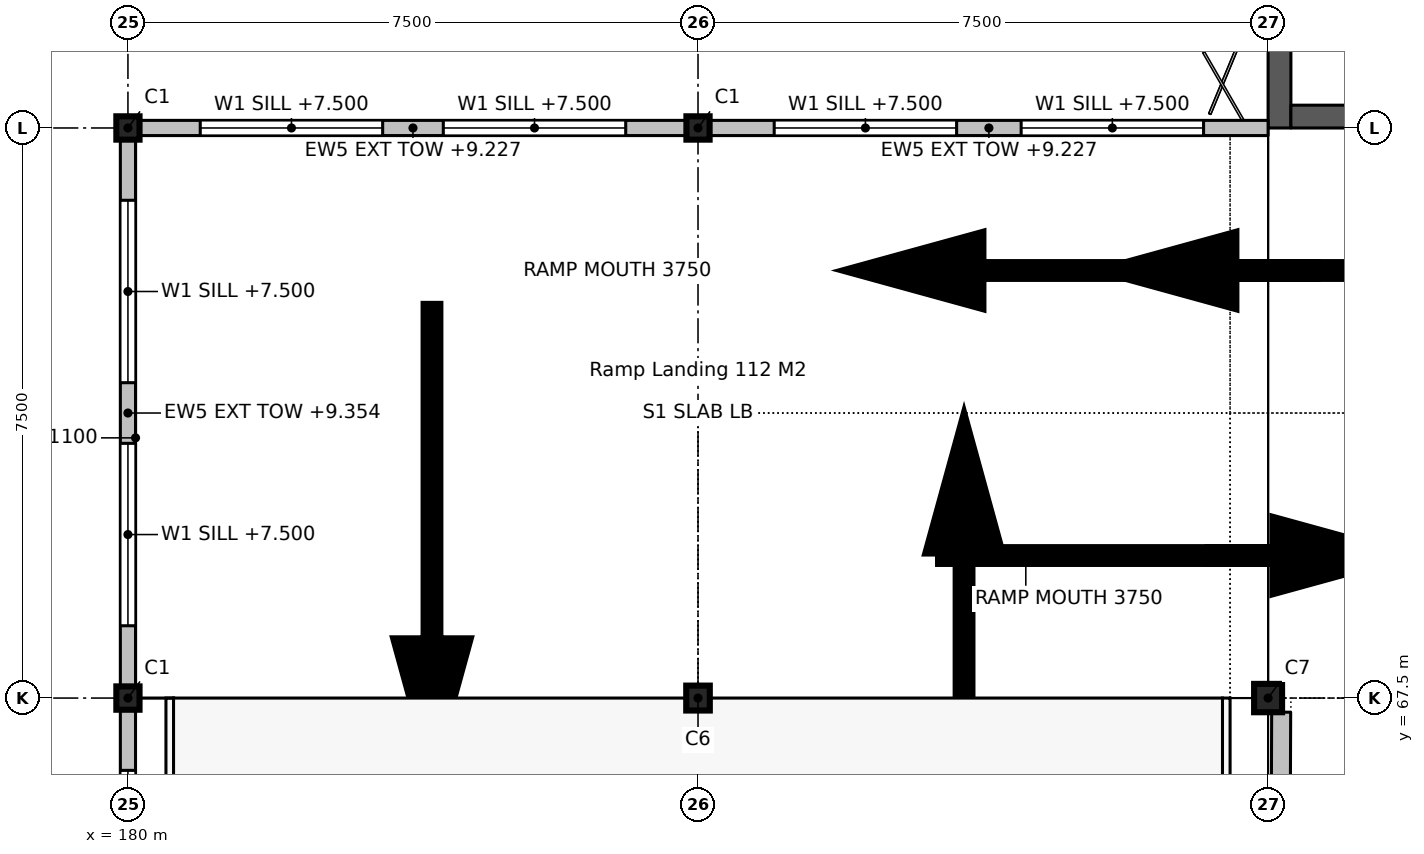
"""IFC4 building model, lengths in metres.
Left out: names, types, materials, properties, quantities, classifications, styles, units other than length and angle.
Written with IfcOpenShell. Run it as: python <this file> out.ifc"""

import sys

from ifc_helpers import new_model, si_unit, direction, frame, frame_2d, origin, origin_2d, place, context, subcontext, project, spatial, rectangle, i_section, extrude, element, fill, save


model = new_model("IFC4")
c1 = context("Model", 3, precision=1e-05, world=origin(), true_north=direction((0.0, 1.0)))
c2 = subcontext(c1, "Body", "Model", "MODEL_VIEW")
j1 = project(units=[si_unit("LENGTHUNIT", "METRE"), si_unit("PLANEANGLEUNIT", "RADIAN")], contexts=[c1])
p1 = place(None, origin())
s1 = spatial("IfcSite", under=j1, at=p1, CompositionType="ELEMENT")
p2 = place(p1, origin())
s2 = spatial("IfcBuilding", under=s1, at=p2, CompositionType="ELEMENT")
p3 = place(p2, frame((0.0, 0.0, 6.6)))
s3 = spatial("IfcBuildingStorey", under=s2, at=p3, CompositionType="ELEMENT", Elevation=6.6)
for number, where, z_axis, x_axis in (
    (1, (180.0, 67.5, 0.0), (0.0, 0.0, 1.0), (1.0, 0.0, 0.0)),
    (2, (180.0, 75.0, 0.0), (0.0, 0.0, 1.0), (1.0, 0.0, 0.0)),
):
    element("IfcColumn", number, at=place(p3, frame(where, z_axis=z_axis, x_axis=x_axis)), inside=s3, PredefinedType="COLUMN", context=c2, shape_type="SweptSolid", body=[
        extrude(i_section(OverallWidth=0.305, OverallDepth=0.307, WebThickness=0.01, FlangeThickness=0.015, FilletRadius=0.015, at=origin_2d()), origin(), (0.0, 0.0, 1.0), 3.3),
    ])
p4 = place(p3, frame((187.5, 67.5, 0.0), z_axis=(0.0, 0.0, 1.0), x_axis=(1.0, 0.0, 0.0)))
e3 = element("IfcColumn", 3, at=p4, inside=s3, PredefinedType="COLUMN", context=c2, shape_type="SweptSolid", body=[
    extrude(i_section(OverallWidth=0.31, OverallDepth=0.328, WebThickness=0.015, FlangeThickness=0.025, FilletRadius=0.015, at=origin_2d()), origin(), (0.0, 0.0, 1.0), 3.3),
])
p5 = place(p3, frame((187.5, 75.0, 0.0), z_axis=(0.0, 0.0, 1.0), x_axis=(1.0, 0.0, 0.0)))
e4 = element("IfcColumn", 4, at=p5, inside=s3, PredefinedType="COLUMN", context=c2, shape_type="SweptSolid", body=[
    extrude(i_section(OverallWidth=0.305, OverallDepth=0.307, WebThickness=0.01, FlangeThickness=0.015, FilletRadius=0.015, at=origin_2d()), origin(), (0.0, 0.0, 1.0), 3.3),
])
p6 = place(p3, frame((195.0, 67.5, 0.0), z_axis=(0.0, 0.0, 1.0), x_axis=(0.0, 1.0, 0.0)))
e5 = element("IfcColumn", 5, at=p6, inside=s3, PredefinedType="COLUMN", context=c2, shape_type="SweptSolid", body=[
    extrude(i_section(OverallWidth=0.373, OverallDepth=0.368, WebThickness=0.015, FlangeThickness=0.024, FilletRadius=0.015, at=origin_2d()), origin(), (0.0, 0.0, 1.0), 3.3),
])
p7 = place(p3, frame((195.172, 67.314, 0.0), z_axis=(0.0, 0.0, 1.0), x_axis=(-0.003681082119, -0.999993224794, 0.0)))
e6 = element("IfcWall", 6, at=p7, inside=s3, PredefinedType="SOLIDWALL", context=c2, shape_type="SweptSolid", body=[
    extrude(rectangle(XDim=7.163, YDim=0.25, at=frame_2d((3.582, 0.0))), origin(), (0.0, 0.0, 1.0), 1.1),
])
p8 = place(p3, frame((180.0, 60.154, 0.0), z_axis=(0.0, 0.0, 1.0), x_axis=(0.0, 1.0, 0.0)))
e7 = element("IfcWall", 7, at=p8, inside=s3, PredefinedType="SOLIDWALL", context=c2, shape_type="SweptSolid", body=[
    extrude(rectangle(XDim=7.193, YDim=0.2, at=frame_2d((3.596, 0.0))), origin(), (0.0, 0.0, 1.0), 2.71),
])
p9 = place(p8, frame((0.798, 0.0, 0.9)))
e8 = element("IfcOpeningElement", 8, at=p9, cuts=e7, PredefinedType="OPENING", context=c2, shape_type="SweptSolid", body=[
    extrude(rectangle(XDim=2.4, YDim=1.5, at=frame_2d((1.2, 0.75))), frame((0.0, 0.11, 0.0), z_axis=(0.0, -1.0, 0.0), x_axis=(1.0, 0.0, 0.0)), (0.0, 0.0, 1.0), 0.22),
])
p10 = place(p8, frame((3.995, 0.0, 0.9)))
e9 = element("IfcOpeningElement", 9, at=p10, cuts=e7, PredefinedType="OPENING", context=c2, shape_type="SweptSolid", body=[
    extrude(rectangle(XDim=2.4, YDim=1.5, at=frame_2d((1.2, 0.75))), frame((0.0, 0.11, 0.0), z_axis=(0.0, -1.0, 0.0), x_axis=(1.0, 0.0, 0.0)), (0.0, 0.0, 1.0), 0.22),
])
p11 = place(p3, frame((180.0, 67.654, 0.0), z_axis=(0.0, 0.0, 1.0), x_axis=(0.0, 1.0, 0.0)))
e10 = element("IfcWall", 10, at=p11, inside=s3, PredefinedType="SOLIDWALL", context=c2, shape_type="SweptSolid", body=[
    extrude(rectangle(XDim=7.193, YDim=0.2, at=frame_2d((3.596, 0.0))), origin(), (0.0, 0.0, 1.0), 2.754),
])
p12 = place(p11, frame((0.798, 0.0, 0.9)))
e11 = element("IfcOpeningElement", 11, at=p12, cuts=e10, PredefinedType="OPENING", context=c2, shape_type="SweptSolid", body=[
    extrude(rectangle(XDim=2.4, YDim=1.5, at=frame_2d((1.2, 0.75))), frame((0.0, 0.11, 0.0), z_axis=(0.0, -1.0, 0.0), x_axis=(1.0, 0.0, 0.0)), (0.0, 0.0, 1.0), 0.22),
])
p13 = place(p11, frame((3.995, 0.0, 0.9)))
e12 = element("IfcOpeningElement", 12, at=p13, cuts=e10, PredefinedType="OPENING", context=c2, shape_type="SweptSolid", body=[
    extrude(rectangle(XDim=2.4, YDim=1.5, at=frame_2d((1.2, 0.75))), frame((0.0, 0.11, 0.0), z_axis=(0.0, -1.0, 0.0), x_axis=(1.0, 0.0, 0.0)), (0.0, 0.0, 1.0), 0.22),
])
p14 = place(p3, frame((180.154, 75.0, 0.0), z_axis=(0.0, 0.0, 1.0), x_axis=(1.0, 0.0, 0.0)))
e13 = element("IfcWall", 13, at=p14, inside=s3, PredefinedType="SOLIDWALL", context=c2, shape_type="SweptSolid", body=[
    extrude(rectangle(XDim=7.193, YDim=0.2, at=frame_2d((3.596, 0.0))), origin(), (0.0, 0.0, 1.0), 2.627),
])
p15 = place(p14, frame((0.798, 0.0, 0.9)))
e14 = element("IfcOpeningElement", 14, at=p15, cuts=e13, PredefinedType="OPENING", context=c2, shape_type="SweptSolid", body=[
    extrude(rectangle(XDim=2.4, YDim=1.5, at=frame_2d((1.2, 0.75))), frame((0.0, 0.11, 0.0), z_axis=(0.0, -1.0, 0.0), x_axis=(1.0, 0.0, 0.0)), (0.0, 0.0, 1.0), 0.22),
])
p16 = place(p14, frame((3.995, 0.0, 0.9)))
e15 = element("IfcOpeningElement", 15, at=p16, cuts=e13, PredefinedType="OPENING", context=c2, shape_type="SweptSolid", body=[
    extrude(rectangle(XDim=2.4, YDim=1.5, at=frame_2d((1.2, 0.75))), frame((0.0, 0.11, 0.0), z_axis=(0.0, -1.0, 0.0), x_axis=(1.0, 0.0, 0.0)), (0.0, 0.0, 1.0), 0.22),
])
p17 = place(p3, frame((187.654, 75.0, 0.0), z_axis=(0.0, 0.0, 1.0), x_axis=(1.0, 0.0, 0.0)))
e16 = element("IfcWall", 16, at=p17, inside=s3, PredefinedType="SOLIDWALL", context=c2, shape_type="SweptSolid", body=[
    extrude(rectangle(XDim=7.346, YDim=0.2, at=frame_2d((3.673, 0.0))), origin(), (0.0, 0.0, 1.0), 2.627),
])
p18 = place(p17, frame((0.849, 0.0, 0.9)))
e17 = element("IfcOpeningElement", 17, at=p18, cuts=e16, PredefinedType="OPENING", context=c2, shape_type="SweptSolid", body=[
    extrude(rectangle(XDim=2.4, YDim=1.5, at=frame_2d((1.2, 0.75))), frame((0.0, 0.11, 0.0), z_axis=(0.0, -1.0, 0.0), x_axis=(1.0, 0.0, 0.0)), (0.0, 0.0, 1.0), 0.22),
])
p19 = place(p17, frame((4.098, 0.0, 0.9)))
e18 = element("IfcOpeningElement", 18, at=p19, cuts=e16, PredefinedType="OPENING", context=c2, shape_type="SweptSolid", body=[
    extrude(rectangle(XDim=2.4, YDim=1.5, at=frame_2d((1.2, 0.75))), frame((0.0, 0.11, 0.0), z_axis=(0.0, -1.0, 0.0), x_axis=(1.0, 0.0, 0.0)), (0.0, 0.0, 1.0), 0.22),
])
p20 = place(p3, frame((195.15, 75.0, 0.0), z_axis=(0.0, 0.0, 1.0), x_axis=(0.0, 1.0, 0.0)))
e19 = element("IfcWall", 19, at=p20, inside=s3, PredefinedType="SHEAR", context=c2, shape_type="SweptSolid", body=[
    extrude(rectangle(XDim=5.0, YDim=0.3, at=frame_2d((2.5, 0.0))), origin(), (0.0, 0.0, 1.0), 3.3),
])
p21 = place(p3, frame((202.2, 75.15, 0.0), z_axis=(0.0, 0.0, 1.0), x_axis=(-1.0, 0.0, 0.0)))
e20 = element("IfcWall", 20, at=p21, inside=s3, PredefinedType="SHEAR", context=c2, shape_type="SweptSolid", body=[
    extrude(rectangle(XDim=6.9, YDim=0.3, at=frame_2d((3.45, 0.0))), origin(), (0.0, 0.0, 1.0), 3.3),
])
p22 = place(p10, origin())
e21 = element("IfcWindow", 21, at=p22, inside=s3, PartitioningType="DOUBLE_PANEL_VERTICAL", PredefinedType="WINDOW", context=c2, shape_type="SweptSolid", body=[
    extrude(rectangle(XDim=2.4, YDim=1.5, at=frame_2d((1.2, 0.75))), frame((0.0, 0.03, 0.0), z_axis=(0.0, -1.0, 0.0), x_axis=(1.0, 0.0, 0.0)), (0.0, 0.0, 1.0), 0.06),
])
fill(e9, e21)
p23 = place(p12, origin())
e22 = element("IfcWindow", 22, at=p23, inside=s3, PartitioningType="DOUBLE_PANEL_VERTICAL", PredefinedType="WINDOW", context=c2, shape_type="SweptSolid", body=[
    extrude(rectangle(XDim=2.4, YDim=1.5, at=frame_2d((1.2, 0.75))), frame((0.0, 0.03, 0.0), z_axis=(0.0, -1.0, 0.0), x_axis=(1.0, 0.0, 0.0)), (0.0, 0.0, 1.0), 0.06),
])
fill(e11, e22)
p24 = place(p13, origin())
e23 = element("IfcWindow", 23, at=p24, inside=s3, PartitioningType="DOUBLE_PANEL_VERTICAL", PredefinedType="WINDOW", context=c2, shape_type="SweptSolid", body=[
    extrude(rectangle(XDim=2.4, YDim=1.5, at=frame_2d((1.2, 0.75))), frame((0.0, 0.03, 0.0), z_axis=(0.0, -1.0, 0.0), x_axis=(1.0, 0.0, 0.0)), (0.0, 0.0, 1.0), 0.06),
])
fill(e12, e23)
p25 = place(p15, origin())
e24 = element("IfcWindow", 24, at=p25, inside=s3, PartitioningType="DOUBLE_PANEL_VERTICAL", PredefinedType="WINDOW", context=c2, shape_type="SweptSolid", body=[
    extrude(rectangle(XDim=2.4, YDim=1.5, at=frame_2d((1.2, 0.75))), frame((0.0, 0.03, 0.0), z_axis=(0.0, -1.0, 0.0), x_axis=(1.0, 0.0, 0.0)), (0.0, 0.0, 1.0), 0.06),
])
fill(e14, e24)
p26 = place(p16, origin())
e25 = element("IfcWindow", 25, at=p26, inside=s3, PartitioningType="DOUBLE_PANEL_VERTICAL", PredefinedType="WINDOW", context=c2, shape_type="SweptSolid", body=[
    extrude(rectangle(XDim=2.4, YDim=1.5, at=frame_2d((1.2, 0.75))), frame((0.0, 0.03, 0.0), z_axis=(0.0, -1.0, 0.0), x_axis=(1.0, 0.0, 0.0)), (0.0, 0.0, 1.0), 0.06),
])
fill(e15, e25)
p27 = place(p18, origin())
e26 = element("IfcWindow", 26, at=p27, inside=s3, PartitioningType="DOUBLE_PANEL_VERTICAL", PredefinedType="WINDOW", context=c2, shape_type="SweptSolid", body=[
    extrude(rectangle(XDim=2.4, YDim=1.5, at=frame_2d((1.2, 0.75))), frame((0.0, 0.03, 0.0), z_axis=(0.0, -1.0, 0.0), x_axis=(1.0, 0.0, 0.0)), (0.0, 0.0, 1.0), 0.06),
])
fill(e17, e26)
p28 = place(p19, origin())
e27 = element("IfcWindow", 27, at=p28, inside=s3, PartitioningType="DOUBLE_PANEL_VERTICAL", PredefinedType="WINDOW", context=c2, shape_type="SweptSolid", body=[
    extrude(rectangle(XDim=2.4, YDim=1.5, at=frame_2d((1.2, 0.75))), frame((0.0, 0.03, 0.0), z_axis=(0.0, -1.0, 0.0), x_axis=(1.0, 0.0, 0.0)), (0.0, 0.0, 1.0), 0.06),
])
fill(e18, e27)
save(model, sys.argv[1])
